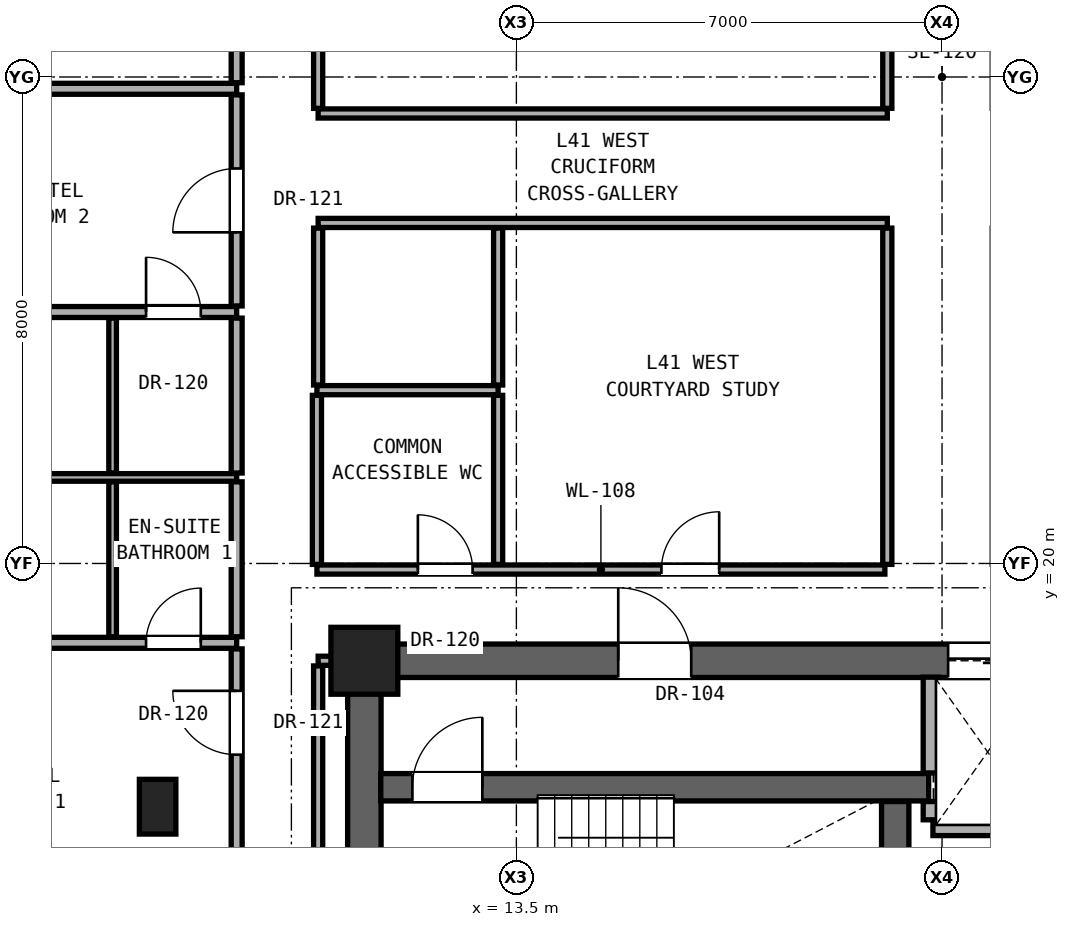
"""IFC4 building model, lengths in metres.
Left out: names, types, materials, properties, quantities, classifications, styles, units other than length and angle.
Written with IfcOpenShell. Run it as: python <this file> out.ifc"""

import sys

from ifc_helpers import new_model, si_unit, direction, frame, frame_2d, origin, origin_2d, place, context, subcontext, project, spatial, rectangle, extrude, element, fill, save


model = new_model("IFC4")
c1 = context("Model", 3, precision=1e-05, world=origin(), true_north=direction((0.0, 1.0)))
c2 = subcontext(c1, "Body", "Model", "MODEL_VIEW")
j1 = project(units=[si_unit("LENGTHUNIT", "METRE"), si_unit("PLANEANGLEUNIT", "RADIAN")], contexts=[c1])
p1 = place(None, origin())
s1 = spatial("IfcSite", under=j1, at=p1, CompositionType="ELEMENT")
p2 = place(p1, origin())
s2 = spatial("IfcBuilding", under=s1, at=p2, CompositionType="ELEMENT")
p3 = place(p2, frame((0.0, 0.0, 144.5)))
s3 = spatial("IfcBuildingStorey", under=s2, at=p3, CompositionType="ELEMENT", Elevation=144.5)
p4 = place(p3, frame((11.0, 18.4, 0.0), z_axis=(0.0, 0.0, 1.0), x_axis=(1.0, 0.0, 0.0)))
e1 = element("IfcColumn", 1, at=p4, inside=s3, PredefinedType="COLUMN", context=c2, shape_type="SweptSolid", body=[
    extrude(rectangle(XDim=1.1, YDim=1.1, at=origin_2d()), origin(), (0.0, 0.0, 1.0), 3.3),
])
p5 = place(p3, frame((7.6, 16.0, 0.0), z_axis=(0.0, 0.0, 1.0), x_axis=(1.0, 0.0, 0.0)))
e2 = element("IfcColumn", 2, at=p5, inside=s3, PredefinedType="PILASTER", context=c2, shape_type="SweptSolid", body=[
    extrude(rectangle(XDim=0.6, YDim=0.9, at=origin_2d()), origin(), (0.0, 0.0, 1.0), 3.3),
])
p6 = place(p3, frame((11.0, 12.4, 0.0), z_axis=(0.0, 0.0, 1.0), x_axis=(0.0, 1.0, 0.0)))
e3 = element("IfcWall", 3, at=p6, inside=s3, PredefinedType="SHEAR", context=c2, shape_type="SweptSolid", body=[
    extrude(rectangle(XDim=6.0, YDim=0.55, at=frame_2d((3.0, 0.0))), origin(), (0.0, 0.0, 1.0), 2.94),
])
p7 = place(p3, frame((11.0, 18.4, 0.0), z_axis=(0.0, 0.0, 1.0), x_axis=(1.0, 0.0, 0.0)))
e4 = element("IfcWall", 4, at=p7, inside=s3, PredefinedType="SHEAR", context=c2, shape_type="SweptSolid", body=[
    extrude(rectangle(XDim=19.0, YDim=0.55, at=frame_2d((9.5, 0.0))), origin(), (0.0, 0.0, 1.0), 2.94),
])
p8 = place(p7, frame((4.175, 0.0, 0.0)))
e5 = element("IfcOpeningElement", 5, at=p8, cuts=e4, PredefinedType="OPENING", context=c2, shape_type="SweptSolid", body=[
    extrude(rectangle(XDim=1.2, YDim=2.25, at=frame_2d((0.6, 1.125))), frame((0.0, 0.285, 0.0), z_axis=(0.0, -1.0, 0.0), x_axis=(1.0, 0.0, 0.0)), (0.0, 0.0, 1.0), 0.57),
])
p9 = place(p7, frame((9.6, 0.0, 0.0)))
e6 = element("IfcOpeningElement", 6, at=p9, cuts=e4, PredefinedType="OPENING", context=c2, shape_type="SweptSolid", body=[
    extrude(rectangle(XDim=1.3, YDim=2.3, at=frame_2d((0.65, 1.15))), frame((0.0, 0.285, 0.0), z_axis=(0.0, -1.0, 0.0), x_axis=(1.0, 0.0, 0.0)), (0.0, 0.0, 1.0), 0.57),
])
p10 = place(p7, frame((11.9, 0.0, 0.0)))
e7 = element("IfcOpeningElement", 7, at=p10, cuts=e4, PredefinedType="OPENING", context=c2, shape_type="SweptSolid", body=[
    extrude(rectangle(XDim=1.3, YDim=2.3, at=frame_2d((0.65, 1.15))), frame((0.0, 0.285, 0.0), z_axis=(0.0, -1.0, 0.0), x_axis=(1.0, 0.0, 0.0)), (0.0, 0.0, 1.0), 0.57),
])
p11 = place(p7, frame((14.3, 0.0, 0.0)))
e8 = element("IfcOpeningElement", 8, at=p11, cuts=e4, PredefinedType="OPENING", context=c2, shape_type="SweptSolid", body=[
    extrude(rectangle(XDim=1.3, YDim=2.3, at=frame_2d((0.65, 1.15))), frame((0.0, 0.285, 0.0), z_axis=(0.0, -1.0, 0.0), x_axis=(1.0, 0.0, 0.0)), (0.0, 0.0, 1.0), 0.57),
])
p12 = place(p7, frame((16.6, 0.0, 0.0)))
e9 = element("IfcOpeningElement", 9, at=p12, cuts=e4, PredefinedType="OPENING", context=c2, shape_type="SweptSolid", body=[
    extrude(rectangle(XDim=1.3, YDim=2.3, at=frame_2d((0.65, 1.15))), frame((0.0, 0.285, 0.0), z_axis=(0.0, -1.0, 0.0), x_axis=(1.0, 0.0, 0.0)), (0.0, 0.0, 1.0), 0.57),
])
p13 = place(p3, frame((20.35, 15.65, 0.0), z_axis=(0.0, 0.0, 1.0), x_axis=(1.0, 0.0, 0.0)))
e10 = element("IfcWall", 10, at=p13, inside=s3, PredefinedType="SOLIDWALL", context=c2, shape_type="SweptSolid", body=[
    extrude(rectangle(XDim=4.15, YDim=0.25, at=frame_2d((2.075, 0.0))), origin(), (0.0, 0.0, 1.0), 2.94),
])
p14 = place(p3, frame((11.27, 16.32, 0.0), z_axis=(0.0, 0.0, 1.0), x_axis=(1.0, 0.0, 0.0)))
e11 = element("IfcWall", 11, at=p14, inside=s3, PredefinedType="SHEAR", context=c2, shape_type="SweptSolid", body=[
    extrude(rectangle(XDim=9.01, YDim=0.45, at=frame_2d((4.505, 0.0))), origin(), (0.0, 0.0, 1.0), 2.94),
])
p15 = place(p14, frame((0.52, 0.0, 0.0)))
e12 = element("IfcOpeningElement", 12, at=p15, cuts=e11, PredefinedType="OPENING", context=c2, shape_type="SweptSolid", body=[
    extrude(rectangle(XDim=1.15, YDim=2.2, at=frame_2d((0.575, 1.1))), frame((0.0, 0.235, 0.0), z_axis=(0.0, -1.0, 0.0), x_axis=(1.0, 0.0, 0.0)), (0.0, 0.0, 1.0), 0.47),
])
p16 = place(p3, frame((10.24, 18.4, 0.0), z_axis=(0.0, 0.0, 1.0), x_axis=(1.0, 0.0, 0.0)))
e13 = element("IfcWall", 13, at=p16, inside=s3, PredefinedType="PARTITIONING", context=c2, shape_type="SweptSolid", body=[
    extrude(rectangle(XDim=0.49, YDim=0.15, at=frame_2d((0.245, 0.0))), origin(), (0.0, 0.0, 1.0), 2.316),
])
p17 = place(p3, frame((-1.62, 18.695, 0.0), z_axis=(0.0, 0.0, 1.0), x_axis=(1.0, 0.0, 0.0)))
e14 = element("IfcWall", 14, at=p17, inside=s3, PredefinedType="PARTITIONING", context=c2, shape_type="SweptSolid", body=[
    extrude(rectangle(XDim=10.52, YDim=0.18, at=frame_2d((5.26, 0.0))), origin(), (0.0, 0.0, 1.0), 2.159),
])
p18 = place(p17, frame((4.435, 0.0, 0.0)))
e15 = element("IfcOpeningElement", 15, at=p18, cuts=e14, PredefinedType="OPENING", context=c2, shape_type="SweptSolid", body=[
    extrude(rectangle(XDim=0.85, YDim=2.01, at=frame_2d((0.425, 1.005))), frame((0.0, 0.1, 0.0), z_axis=(0.0, -1.0, 0.0), x_axis=(1.0, 0.0, 0.0)), (0.0, 0.0, 1.0), 0.2),
])
p19 = place(p17, frame((9.03, 0.0, 0.0)))
e16 = element("IfcOpeningElement", 16, at=p19, cuts=e14, PredefinedType="OPENING", context=c2, shape_type="SweptSolid", body=[
    extrude(rectangle(XDim=0.9, YDim=2.1, at=frame_2d((0.45, 1.05))), frame((0.0, 0.1, 0.0), z_axis=(0.0, -1.0, 0.0), x_axis=(1.0, 0.0, 0.0)), (0.0, 0.0, 1.0), 0.2),
])
p20 = place(p3, frame((10.22, 19.9, 0.0), z_axis=(0.0, 0.0, 1.0), x_axis=(1.0, 0.0, 0.0)))
e17 = element("IfcWall", 17, at=p20, inside=s3, PredefinedType="PARTITIONING", context=c2, shape_type="SweptSolid", body=[
    extrude(rectangle(XDim=9.34, YDim=0.15, at=frame_2d((4.67, 0.0))), origin(), (0.0, 0.0, 1.0), 2.316),
])
p21 = place(p20, frame((1.66, 0.0, 0.0)))
e18 = element("IfcOpeningElement", 18, at=p21, cuts=e17, PredefinedType="OPENING", context=c2, shape_type="SweptSolid", body=[
    extrude(rectangle(XDim=0.9, YDim=2.1, at=frame_2d((0.45, 1.05))), frame((0.0, 0.085, 0.0), z_axis=(0.0, -1.0, 0.0), x_axis=(1.0, 0.0, 0.0)), (0.0, 0.0, 1.0), 0.17),
])
p22 = place(p20, frame((5.665, 0.0, 0.0)))
e19 = element("IfcOpeningElement", 19, at=p22, cuts=e17, PredefinedType="OPENING", context=c2, shape_type="SweptSolid", body=[
    extrude(rectangle(XDim=0.95, YDim=2.15, at=frame_2d((0.475, 1.075))), frame((0.0, 0.085, 0.0), z_axis=(0.0, -1.0, 0.0), x_axis=(1.0, 0.0, 0.0)), (0.0, 0.0, 1.0), 0.17),
])
p23 = place(p3, frame((-1.62, 21.415, 0.0), z_axis=(0.0, 0.0, 1.0), x_axis=(1.0, 0.0, 0.0)))
e20 = element("IfcWall", 20, at=p23, inside=s3, PredefinedType="PARTITIONING", context=c2, shape_type="SweptSolid", body=[
    extrude(rectangle(XDim=10.52, YDim=0.125, at=frame_2d((5.26, 0.0))), origin(), (0.0, 0.0, 1.0), 2.159),
])
p24 = place(p3, frame((10.22, 22.85, 0.0), z_axis=(0.0, 0.0, 1.0), x_axis=(1.0, 0.0, 0.0)))
e21 = element("IfcWall", 21, at=p24, inside=s3, PredefinedType="PARTITIONING", context=c2, shape_type="SweptSolid", body=[
    extrude(rectangle(XDim=2.98, YDim=0.15, at=frame_2d((1.49, 0.0))), origin(), (0.0, 0.0, 1.0), 2.316),
])
p25 = place(p3, frame((-1.62, 24.135, 0.0), z_axis=(0.0, 0.0, 1.0), x_axis=(1.0, 0.0, 0.0)))
e22 = element("IfcWall", 22, at=p25, inside=s3, PredefinedType="PARTITIONING", context=c2, shape_type="SweptSolid", body=[
    extrude(rectangle(XDim=10.52, YDim=0.18, at=frame_2d((5.26, 0.0))), origin(), (0.0, 0.0, 1.0), 2.159),
])
p26 = place(p25, frame((4.435, 0.0, 0.0)))
e23 = element("IfcOpeningElement", 23, at=p26, cuts=e22, PredefinedType="OPENING", context=c2, shape_type="SweptSolid", body=[
    extrude(rectangle(XDim=0.85, YDim=2.01, at=frame_2d((0.425, 1.005))), frame((0.0, 0.1, 0.0), z_axis=(0.0, -1.0, 0.0), x_axis=(1.0, 0.0, 0.0)), (0.0, 0.0, 1.0), 0.2),
])
p27 = place(p25, frame((9.03, 0.0, 0.0)))
e24 = element("IfcOpeningElement", 24, at=p27, cuts=e22, PredefinedType="OPENING", context=c2, shape_type="SweptSolid", body=[
    extrude(rectangle(XDim=0.9, YDim=2.1, at=frame_2d((0.45, 1.05))), frame((0.0, 0.1, 0.0), z_axis=(0.0, -1.0, 0.0), x_axis=(1.0, 0.0, 0.0)), (0.0, 0.0, 1.0), 0.2),
])
for number, where, z_axis, x_axis in (
    (25, (10.24, 25.6, 0.0), (0.0, 0.0, 1.0), (1.0, 0.0, 0.0)),
    (26, (10.24, 27.4, 0.0), (0.0, 0.0, 1.0), (1.0, 0.0, 0.0)),
):
    element("IfcWall", number, at=place(p3, frame(where, z_axis=z_axis, x_axis=x_axis)), inside=s3, PredefinedType="PARTITIONING", context=c2, shape_type="SweptSolid", body=[
        extrude(rectangle(XDim=9.36, YDim=0.15, at=frame_2d((4.68, 0.0))), origin(), (0.0, 0.0, 1.0), 2.316),
    ])
p28 = place(p3, frame((-1.62, 27.806, 0.0), z_axis=(0.0, 0.0, 1.0), x_axis=(1.0, 0.0, 0.0)))
e27 = element("IfcWall", 27, at=p28, inside=s3, PredefinedType="PARTITIONING", context=c2, shape_type="SweptSolid", body=[
    extrude(rectangle(XDim=10.52, YDim=0.18, at=frame_2d((5.26, 0.0))), origin(), (0.0, 0.0, 1.0), 2.159),
])
p29 = place(p3, frame((6.86, 18.795, 0.0), z_axis=(0.0, 0.0, 1.0), x_axis=(0.0, 1.0, 0.0)))
e28 = element("IfcWall", 28, at=p29, inside=s3, PredefinedType="PARTITIONING", context=c2, shape_type="SweptSolid", body=[
    extrude(rectangle(XDim=2.548, YDim=0.125, at=frame_2d((1.274, 0.0))), origin(), (0.0, 0.0, 1.0), 2.332),
])
p30 = place(p3, frame((6.86, 21.488, 0.0), z_axis=(0.0, 0.0, 1.0), x_axis=(0.0, 1.0, 0.0)))
e29 = element("IfcWall", 29, at=p30, inside=s3, PredefinedType="PARTITIONING", context=c2, shape_type="SweptSolid", body=[
    extrude(rectangle(XDim=2.547, YDim=0.125, at=frame_2d((1.274, 0.0))), origin(), (0.0, 0.0, 1.0), 2.94),
])
p31 = place(p3, frame((8.9, 14.266, 0.0), z_axis=(0.0, 0.0, 1.0), x_axis=(0.0, 1.0, 0.0)))
e30 = element("IfcWall", 30, at=p31, inside=s3, PredefinedType="PARTITIONING", context=c2, shape_type="SweptSolid", body=[
    extrude(rectangle(XDim=4.329, YDim=0.18, at=frame_2d((2.165, 0.0))), origin(), (0.0, 0.0, 1.0), 2.316),
])
p32 = place(p31, frame((2.59, 0.0, 0.0)))
e31 = element("IfcOpeningElement", 31, at=p32, cuts=e30, PredefinedType="OPENING", context=c2, shape_type="SweptSolid", body=[
    extrude(rectangle(XDim=1.05, YDim=2.2, at=frame_2d((0.525, 1.1))), frame((0.0, 0.1, 0.0), z_axis=(0.0, -1.0, 0.0), x_axis=(1.0, 0.0, 0.0)), (0.0, 0.0, 1.0), 0.2),
])
p33 = place(p3, frame((8.9, 18.795, 0.0), z_axis=(0.0, 0.0, 1.0), x_axis=(0.0, 1.0, 0.0)))
e32 = element("IfcWall", 32, at=p33, inside=s3, PredefinedType="PARTITIONING", context=c2, shape_type="SweptSolid", body=[
    extrude(rectangle(XDim=2.548, YDim=0.18, at=frame_2d((1.274, 0.0))), origin(), (0.0, 0.0, 1.0), 2.332),
])
p34 = place(p3, frame((8.9, 21.488, 0.0), z_axis=(0.0, 0.0, 1.0), x_axis=(0.0, 1.0, 0.0)))
e33 = element("IfcWall", 33, at=p34, inside=s3, PredefinedType="PARTITIONING", context=c2, shape_type="SweptSolid", body=[
    extrude(rectangle(XDim=2.547, YDim=0.18, at=frame_2d((1.274, 0.0))), origin(), (0.0, 0.0, 1.0), 2.94),
])
p35 = place(p3, frame((8.9, 24.235, 0.0), z_axis=(0.0, 0.0, 1.0), x_axis=(0.0, 1.0, 0.0)))
e34 = element("IfcWall", 34, at=p35, inside=s3, PredefinedType="PARTITIONING", context=c2, shape_type="SweptSolid", body=[
    extrude(rectangle(XDim=3.471, YDim=0.18, at=frame_2d((1.735, 0.0))), origin(), (0.0, 0.0, 1.0), 2.316),
])
p36 = place(p35, frame((1.21, 0.0, 0.0)))
e35 = element("IfcOpeningElement", 35, at=p36, cuts=e34, PredefinedType="OPENING", context=c2, shape_type="SweptSolid", body=[
    extrude(rectangle(XDim=1.05, YDim=2.2, at=frame_2d((0.525, 1.1))), frame((0.0, 0.1, 0.0), z_axis=(0.0, -1.0, 0.0), x_axis=(1.0, 0.0, 0.0)), (0.0, 0.0, 1.0), 0.2),
])
p37 = place(p3, frame((8.9, 27.906, 0.0), z_axis=(0.0, 0.0, 1.0), x_axis=(0.0, 1.0, 0.0)))
e36 = element("IfcWall", 36, at=p37, inside=s3, PredefinedType="PARTITIONING", context=c2, shape_type="SweptSolid", body=[
    extrude(rectangle(XDim=3.859, YDim=0.18, at=frame_2d((1.929, 0.0))), origin(), (0.0, 0.0, 1.0), 2.316),
])
p38 = place(p37, frame((1.405, 0.0, 0.0)))
e37 = element("IfcOpeningElement", 37, at=p38, cuts=e36, PredefinedType="OPENING", context=c2, shape_type="SweptSolid", body=[
    extrude(rectangle(XDim=1.05, YDim=2.2, at=frame_2d((0.525, 1.1))), frame((0.0, 0.1, 0.0), z_axis=(0.0, -1.0, 0.0), x_axis=(1.0, 0.0, 0.0)), (0.0, 0.0, 1.0), 0.2),
])
p39 = place(p3, frame((10.22, 19.985, 0.0), z_axis=(0.0, 0.0, 1.0), x_axis=(0.0, 1.0, 0.0)))
e38 = element("IfcWall", 38, at=p39, inside=s3, PredefinedType="PARTITIONING", context=c2, shape_type="SweptSolid", body=[
    extrude(rectangle(XDim=2.78, YDim=0.15, at=frame_2d((1.39, 0.0))), origin(), (0.0, 0.0, 1.0), 2.94),
])
p40 = place(p3, frame((10.24, 12.335, 0.0), z_axis=(0.0, 0.0, 1.0), x_axis=(0.0, 1.0, 0.0)))
e39 = element("IfcWall", 39, at=p40, inside=s3, PredefinedType="PARTITIONING", context=c2, shape_type="SweptSolid", body=[
    extrude(rectangle(XDim=5.98, YDim=0.15, at=frame_2d((2.99, 0.0))), origin(), (0.0, 0.0, 1.0), 2.316),
])
p41 = place(p3, frame((10.24, 22.935, 0.0), z_axis=(0.0, 0.0, 1.0), x_axis=(0.0, 1.0, 0.0)))
e40 = element("IfcWall", 40, at=p41, inside=s3, PredefinedType="PARTITIONING", context=c2, shape_type="SweptSolid", body=[
    extrude(rectangle(XDim=2.58, YDim=0.15, at=frame_2d((1.29, 0.0))), origin(), (0.0, 0.0, 1.0), 2.316),
])
p42 = place(p3, frame((10.24, 27.485, 0.0), z_axis=(0.0, 0.0, 1.0), x_axis=(0.0, 1.0, 0.0)))
e41 = element("IfcWall", 41, at=p42, inside=s3, PredefinedType="PARTITIONING", context=c2, shape_type="SweptSolid", body=[
    extrude(rectangle(XDim=5.53, YDim=0.15, at=frame_2d((2.765, 0.0))), origin(), (0.0, 0.0, 1.0), 2.316),
])
p43 = place(p42, frame((2.29, 0.0, 0.0)))
e42 = element("IfcOpeningElement", 42, at=p43, cuts=e41, PredefinedType="OPENING", context=c2, shape_type="SweptSolid", body=[
    extrude(rectangle(XDim=0.95, YDim=2.15, at=frame_2d((0.475, 1.075))), frame((0.0, 0.085, 0.0), z_axis=(0.0, -1.0, 0.0), x_axis=(1.0, 0.0, 0.0)), (0.0, 0.0, 1.0), 0.17),
])
p44 = place(p3, frame((13.2, 19.985, 0.0), z_axis=(0.0, 0.0, 1.0), x_axis=(0.0, 1.0, 0.0)))
e43 = element("IfcWall", 43, at=p44, inside=s3, PredefinedType="PARTITIONING", context=c2, shape_type="SweptSolid", body=[
    extrude(rectangle(XDim=2.78, YDim=0.15, at=frame_2d((1.39, 0.0))), origin(), (0.0, 0.0, 1.0), 2.94),
])
p45 = place(p3, frame((13.2, 22.935, 0.0), z_axis=(0.0, 0.0, 1.0), x_axis=(0.0, 1.0, 0.0)))
e44 = element("IfcWall", 44, at=p45, inside=s3, PredefinedType="PARTITIONING", context=c2, shape_type="SweptSolid", body=[
    extrude(rectangle(XDim=2.58, YDim=0.15, at=frame_2d((1.29, 0.0))), origin(), (0.0, 0.0, 1.0), 2.316),
])
for number, where, z_axis, x_axis in (
    (45, (19.6, 19.985, 0.0), (0.0, 0.0, 1.0), (0.0, 1.0, 0.0)),
    (46, (19.6, 27.485, 0.0), (0.0, 0.0, 1.0), (0.0, 1.0, 0.0)),
):
    element("IfcWall", number, at=place(p3, frame(where, z_axis=z_axis, x_axis=x_axis)), inside=s3, PredefinedType="PARTITIONING", context=c2, shape_type="SweptSolid", body=[
        extrude(rectangle(XDim=5.53, YDim=0.15, at=frame_2d((2.765, 0.0))), origin(), (0.0, 0.0, 1.0), 2.316),
    ])
p46 = place(p3, frame((19.73, 13.355, 0.0), z_axis=(0.0, 0.0, 1.0), x_axis=(0.0, 1.0, 0.0)))
e47 = element("IfcWall", 47, at=p46, inside=s3, PredefinedType="SHEAR", context=c2, shape_type="SweptSolid", body=[
    extrude(rectangle(XDim=2.73, YDim=0.45, at=frame_2d((1.365, 0.0))), origin(), (0.0, 0.0, 1.0), 2.94),
])
p47 = place(p3, frame((20.315, 15.785, 0.0), z_axis=(0.0, 0.0, 1.0), x_axis=(0.0, 1.0, 0.0)))
e48 = element("IfcWall", 48, at=p47, inside=s3, PredefinedType="SOLIDWALL", context=c2, shape_type="SweptSolid", body=[
    extrude(rectangle(XDim=0.3, YDim=0.25, at=frame_2d((0.15, 0.0))), origin(), (0.0, 0.0, 1.0), 2.94),
])
p48 = place(p3, frame((20.315, 16.555, 0.0), z_axis=(0.0, 0.0, 1.0), x_axis=(0.0, 1.0, 0.0)))
e49 = element("IfcWall", 49, at=p48, inside=s3, PredefinedType="SOLIDWALL", context=c2, shape_type="SweptSolid", body=[
    extrude(rectangle(XDim=1.575, YDim=0.25, at=frame_2d((0.788, 0.0))), origin(), (0.0, 0.0, 1.0), 2.94),
])
p49 = place(p8, origin())
e50 = element("IfcDoor", 50, at=p49, inside=s3, OperationType="SINGLE_SWING_LEFT", PredefinedType="DOOR", context=c2, shape_type="SweptSolid", body=[
    extrude(rectangle(XDim=1.2, YDim=2.25, at=frame_2d((0.6, 1.125))), frame((0.0, 0.025, 0.0), z_axis=(0.0, -1.0, 0.0), x_axis=(1.0, 0.0, 0.0)), (0.0, 0.0, 1.0), 0.05),
])
fill(e5, e50)
p50 = place(p15, origin())
e51 = element("IfcDoor", 51, at=p50, inside=s3, OperationType="SINGLE_SWING_RIGHT", PredefinedType="DOOR", context=c2, shape_type="SweptSolid", body=[
    extrude(rectangle(XDim=1.15, YDim=2.2, at=frame_2d((0.575, 1.1))), frame((0.0, 0.025, 0.0), z_axis=(0.0, -1.0, 0.0), x_axis=(1.0, 0.0, 0.0)), (0.0, 0.0, 1.0), 0.05),
])
fill(e12, e51)
p51 = place(p21, origin())
e52 = element("IfcDoor", 52, at=p51, inside=s3, OperationType="SINGLE_SWING_LEFT", PredefinedType="DOOR", context=c2, shape_type="SweptSolid", body=[
    extrude(rectangle(XDim=0.9, YDim=2.1, at=frame_2d((0.45, 1.05))), frame((0.0, 0.025, 0.0), z_axis=(0.0, -1.0, 0.0), x_axis=(1.0, 0.0, 0.0)), (0.0, 0.0, 1.0), 0.05),
])
fill(e18, e52)
p52 = place(p32, origin())
e53 = element("IfcDoor", 53, at=p52, inside=s3, OperationType="SINGLE_SWING_RIGHT", PredefinedType="DOOR", context=c2, shape_type="SweptSolid", body=[
    extrude(rectangle(XDim=1.05, YDim=2.2, at=frame_2d((0.525, 1.1))), frame((0.0, 0.025, 0.0), z_axis=(0.0, -1.0, 0.0), x_axis=(1.0, 0.0, 0.0)), (0.0, 0.0, 1.0), 0.05),
])
fill(e31, e53)
p53 = place(p19, origin())
e54 = element("IfcDoor", 54, at=p53, inside=s3, OperationType="SINGLE_SWING_RIGHT", PredefinedType="DOOR", context=c2, shape_type="SweptSolid", body=[
    extrude(rectangle(XDim=0.9, YDim=2.1, at=frame_2d((0.45, 1.05))), frame((0.0, 0.025, 0.0), z_axis=(0.0, -1.0, 0.0), x_axis=(1.0, 0.0, 0.0)), (0.0, 0.0, 1.0), 0.05),
])
fill(e16, e54)
p54 = place(p36, origin())
e55 = element("IfcDoor", 55, at=p54, inside=s3, OperationType="SINGLE_SWING_LEFT", PredefinedType="DOOR", context=c2, shape_type="SweptSolid", body=[
    extrude(rectangle(XDim=1.05, YDim=2.2, at=frame_2d((0.525, 1.1))), frame((0.0, 0.025, 0.0), z_axis=(0.0, -1.0, 0.0), x_axis=(1.0, 0.0, 0.0)), (0.0, 0.0, 1.0), 0.05),
])
fill(e35, e55)
p55 = place(p27, origin())
e56 = element("IfcDoor", 56, at=p55, inside=s3, OperationType="SINGLE_SWING_LEFT", PredefinedType="DOOR", context=c2, shape_type="SweptSolid", body=[
    extrude(rectangle(XDim=0.9, YDim=2.1, at=frame_2d((0.45, 1.05))), frame((0.0, 0.025, 0.0), z_axis=(0.0, -1.0, 0.0), x_axis=(1.0, 0.0, 0.0)), (0.0, 0.0, 1.0), 0.05),
])
fill(e24, e56)
p56 = place(p22, origin())
e57 = element("IfcDoor", 57, at=p56, inside=s3, OperationType="SINGLE_SWING_RIGHT", PredefinedType="DOOR", context=c2, shape_type="SweptSolid", body=[
    extrude(rectangle(XDim=0.95, YDim=2.15, at=frame_2d((0.475, 1.075))), frame((0.0, 0.025, 0.0), z_axis=(0.0, -1.0, 0.0), x_axis=(1.0, 0.0, 0.0)), (0.0, 0.0, 1.0), 0.05),
])
fill(e19, e57)
p57 = place(p9, origin())
e58 = element("IfcDoor", 58, at=p57, inside=s3, OperationType="DOUBLE_DOOR_SLIDING", PredefinedType="DOOR", context=c2, shape_type="SweptSolid", body=[
    extrude(rectangle(XDim=1.3, YDim=2.3, at=frame_2d((0.65, 1.15))), frame((0.0, 0.025, 0.0), z_axis=(0.0, -1.0, 0.0), x_axis=(1.0, 0.0, 0.0)), (0.0, 0.0, 1.0), 0.05),
])
fill(e6, e58)
save(model, sys.argv[1])
